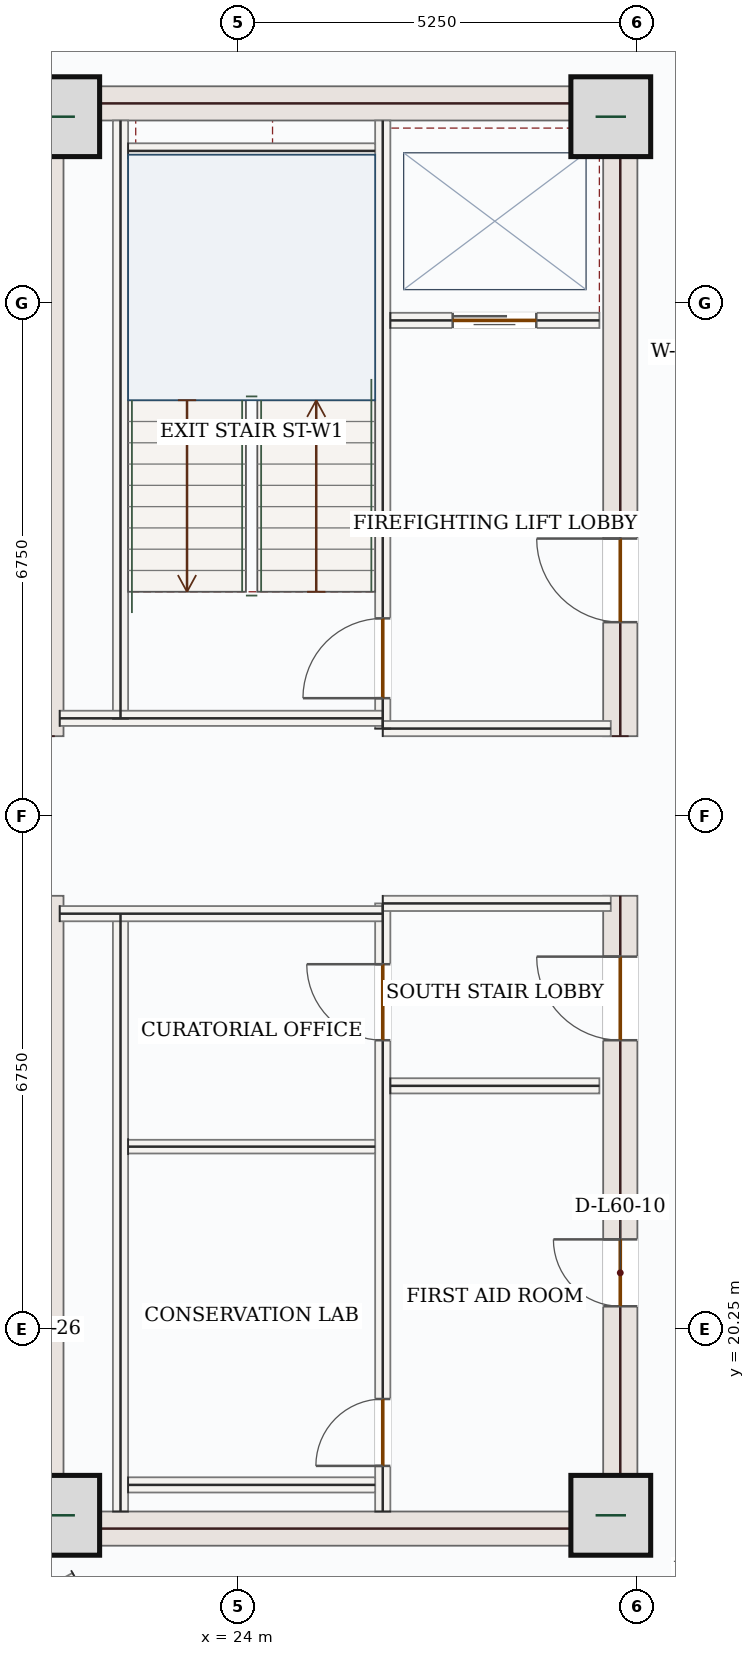
"""IFC4 building model, lengths in metres.
Left out: names, types, materials, properties, quantities, classifications, styles, units other than length and angle.
Written with IfcOpenShell. Run it as: python <this file> out.ifc"""

import sys

from ifc_helpers import new_model, si_unit, direction, frame, frame_2d, origin, origin_2d, place, context, subcontext, project, spatial, rectangle, extrude, source, transform, mapped, element, fill, save


model = new_model("IFC4")
c1 = context("Model", 3, precision=1e-05, world=origin(), true_north=direction((0.0, 1.0)))
c2 = subcontext(c1, "Body", "Model", "MODEL_VIEW")
j1 = project(units=[si_unit("LENGTHUNIT", "METRE"), si_unit("PLANEANGLEUNIT", "RADIAN")], contexts=[c1])
p1 = place(None, origin())
s1 = spatial("IfcSite", under=j1, at=p1, CompositionType="ELEMENT")
p2 = place(p1, origin())
s2 = spatial("IfcBuilding", under=s1, at=p2, CompositionType="ELEMENT")
p3 = place(p2, frame((0.0, 0.0, 254.1)))
s3 = spatial("IfcBuildingStorey", under=s2, at=p3, CompositionType="ELEMENT", Elevation=254.1)
m1 = source(origin(), c2, "Body", "SweptSolid", [
    extrude(rectangle(XDim=8.55, YDim=0.45, at=frame_2d((4.275, 0.0))), origin(), (0.0, 0.0, 1.0), 3.5),
])
for number, where, z_axis, x_axis in (
    (1, (21.475, 17.4, 0.0), (0.0, 0.0, 1.0), (0.0, 1.0, 0.0)),
    (2, (21.475, 28.05, 0.0), (0.0, 0.0, 1.0), (0.0, 1.0, 0.0)),
):
    element("IfcWall", number, at=place(p3, frame(where, z_axis=z_axis, x_axis=x_axis)), inside=s3, PredefinedType="SHEAR", context=c2, shape_type="MappedRepresentation", body=[
        mapped(m1, transform((0.0, 0.0, 0.0), x_axis=(1.0, 0.0, 0.0), y_axis=(0.0, 1.0, 0.0), z_axis=(0.0, 0.0, 1.0), scale=1.0)),
    ])
p4 = place(p3, frame((29.025, 17.4, 0.0), z_axis=(0.0, 0.0, 1.0), x_axis=(0.0, 1.0, 0.0)))
e3 = element("IfcWall", 3, at=p4, inside=s3, PredefinedType="SHEAR", context=c2, shape_type="SweptSolid", body=[
    extrude(rectangle(XDim=8.55, YDim=0.45, at=frame_2d((4.275, 0.0))), origin(), (0.0, 0.0, 1.0), 3.5),
])
p5 = place(p4, frame((6.65, 0.0, 0.0)))
e4 = element("IfcOpeningElement", 4, at=p5, cuts=e3, PredefinedType="OPENING", context=c2, shape_type="SweptSolid", body=[
    extrude(rectangle(XDim=1.1, YDim=2.2, at=frame_2d((0.55, 1.1))), frame((0.0, 0.235, 0.0), z_axis=(0.0, -1.0, 0.0), x_axis=(1.0, 0.0, 0.0)), (0.0, 0.0, 1.0), 0.47),
])
p6 = place(p4, frame((3.15, 0.0, 0.0)))
e5 = element("IfcOpeningElement", 5, at=p6, cuts=e3, PredefinedType="OPENING", context=c2, shape_type="SweptSolid", body=[
    extrude(rectangle(XDim=0.88, YDim=2.1, at=frame_2d((0.44, 1.05))), frame((0.0, 0.235, 0.0), z_axis=(0.0, -1.0, 0.0), x_axis=(1.0, 0.0, 0.0)), (0.0, 0.0, 1.0), 0.47),
])
p7 = place(p3, frame((29.025, 28.05, 0.0), z_axis=(0.0, 0.0, 1.0), x_axis=(0.0, 1.0, 0.0)))
e6 = element("IfcWall", 6, at=p7, inside=s3, PredefinedType="SHEAR", context=c2, shape_type="SweptSolid", body=[
    extrude(rectangle(XDim=8.55, YDim=0.45, at=frame_2d((4.275, 0.0))), origin(), (0.0, 0.0, 1.0), 3.5),
])
p8 = place(p7, frame((1.5, 0.0, 0.0)))
e7 = element("IfcOpeningElement", 7, at=p8, cuts=e6, PredefinedType="OPENING", context=c2, shape_type="SweptSolid", body=[
    extrude(rectangle(XDim=1.1, YDim=2.2, at=frame_2d((0.55, 1.1))), frame((0.0, 0.235, 0.0), z_axis=(0.0, -1.0, 0.0), x_axis=(1.0, 0.0, 0.0)), (0.0, 0.0, 1.0), 0.47),
])
m2 = source(origin(), c2, "Body", "SweptSolid", [
    extrude(rectangle(XDim=7.1, YDim=0.45, at=frame_2d((3.55, 0.0))), origin(), (0.0, 0.0, 1.0), 3.5),
])
for number, where, z_axis, x_axis in (
    (8, (21.7, 17.625, 0.0), (0.0, 0.0, 1.0), (1.0, 0.0, 0.0)),
    (9, (21.7, 36.375, 0.0), (0.0, 0.0, 1.0), (1.0, 0.0, 0.0)),
):
    element("IfcWall", number, at=place(p3, frame(where, z_axis=z_axis, x_axis=x_axis)), inside=s3, PredefinedType="SHEAR", context=c2, shape_type="MappedRepresentation", body=[
        mapped(m2, transform((0.0, 0.0, 0.0), x_axis=(1.0, 0.0, 0.0), y_axis=(0.0, 1.0, 0.0), z_axis=(0.0, 0.0, 1.0), scale=1.0)),
    ])
m3 = source(origin(), c2, "Body", "SweptSolid", [
    extrude(rectangle(XDim=1.05, YDim=1.05, at=origin_2d()), origin(), (0.0, 0.0, 1.0), 3.75),
])
for number, where, z_axis, x_axis in (
    (10, (21.65, 17.8, 0.0), (0.0, 0.0, 1.0), (1.0, 0.0, 0.0)),
    (11, (28.9, 17.8, 0.0), (0.0, 0.0, 1.0), (1.0, 0.0, 0.0)),
    (12, (21.65, 36.2, 0.0), (0.0, 0.0, 1.0), (1.0, 0.0, 0.0)),
    (13, (28.9, 36.2, 0.0), (0.0, 0.0, 1.0), (1.0, 0.0, 0.0)),
):
    element("IfcColumn", number, at=place(p3, frame(where, z_axis=z_axis, x_axis=x_axis)), inside=s3, PredefinedType="COLUMN", context=c2, shape_type="MappedRepresentation", body=[
        mapped(m3, transform((0.0, 0.0, 0.0), x_axis=(1.0, 0.0, 0.0), y_axis=(0.0, 1.0, 0.0), z_axis=(0.0, 0.0, 1.0), scale=1.0)),
    ])
m4 = source(origin(), c2, "Body", "SweptSolid", [
    extrude(rectangle(XDim=4.394, YDim=0.28, at=frame_2d((2.197, 0.0))), origin(), (0.0, 0.0, 1.0), 3.5),
])
p9 = place(p3, frame((18.94, 35.542, 0.0), z_axis=(0.0, 0.0, 1.0), x_axis=(0.707106781187, 0.707106781187, 0.0)))
e14 = element("IfcWall", 14, at=p9, inside=s3, PredefinedType="SOLIDWALL", context=c2, shape_type="MappedRepresentation", body=[
    mapped(m4, transform((0.0, 0.0, 0.0), x_axis=(1.0, 0.0, 0.0), y_axis=(0.0, 1.0, 0.0), z_axis=(0.0, 0.0, 1.0), scale=1.0)),
])
m5 = source(origin(), c2, "Body", "SweptSolid", [
    extrude(rectangle(XDim=7.87, YDim=0.2, at=frame_2d((3.935, 0.0))), origin(), (0.0, 0.0, 1.0), 3.5),
])
for number, where, z_axis, x_axis in (
    (15, (22.45, 17.85, 0.0), (0.0, 0.0, 1.0), (0.0, 1.0, 0.0)),
    (16, (22.45, 28.28, 0.0), (0.0, 0.0, 1.0), (0.0, 1.0, 0.0)),
):
    element("IfcWall", number, at=place(p3, frame(where, z_axis=z_axis, x_axis=x_axis)), inside=s3, PredefinedType="SOLIDWALL", context=c2, shape_type="MappedRepresentation", body=[
        mapped(m5, transform((0.0, 0.0, 0.0), x_axis=(1.0, 0.0, 0.0), y_axis=(0.0, 1.0, 0.0), z_axis=(0.0, 0.0, 1.0), scale=1.0)),
    ])
p10 = place(p3, frame((25.9, 17.85, 0.0), z_axis=(0.0, 0.0, 1.0), x_axis=(0.0, 1.0, 0.0)))
e17 = element("IfcWall", 17, at=p10, inside=s3, PredefinedType="SOLIDWALL", context=c2, shape_type="SweptSolid", body=[
    extrude(rectangle(XDim=8.0, YDim=0.2, at=frame_2d((4.0, 0.0))), origin(), (0.0, 0.0, 1.0), 3.5),
])
p11 = place(p10, frame((6.2, 0.0, 0.0)))
e18 = element("IfcOpeningElement", 18, at=p11, cuts=e17, PredefinedType="OPENING", context=c2, shape_type="SweptSolid", body=[
    extrude(rectangle(XDim=1.0, YDim=2.15, at=frame_2d((0.5, 1.075))), frame((0.0, 0.11, 0.0), z_axis=(0.0, -1.0, 0.0), x_axis=(1.0, 0.0, 0.0)), (0.0, 0.0, 1.0), 0.22),
])
p12 = place(p10, frame((0.6, 0.0, 0.0)))
e19 = element("IfcOpeningElement", 19, at=p12, cuts=e17, PredefinedType="OPENING", context=c2, shape_type="SweptSolid", body=[
    extrude(rectangle(XDim=0.88, YDim=2.1, at=frame_2d((0.44, 1.05))), frame((0.0, 0.11, 0.0), z_axis=(0.0, -1.0, 0.0), x_axis=(1.0, 0.0, 0.0)), (0.0, 0.0, 1.0), 0.22),
])
p13 = place(p3, frame((25.9, 28.15, 0.0), z_axis=(0.0, 0.0, 1.0), x_axis=(0.0, 1.0, 0.0)))
e20 = element("IfcWall", 20, at=p13, inside=s3, PredefinedType="SOLIDWALL", context=c2, shape_type="SweptSolid", body=[
    extrude(rectangle(XDim=8.0, YDim=0.2, at=frame_2d((4.0, 0.0))), origin(), (0.0, 0.0, 1.0), 3.5),
])
p14 = place(p13, frame((0.4, 0.0, 0.0)))
e21 = element("IfcOpeningElement", 21, at=p14, cuts=e20, PredefinedType="OPENING", context=c2, shape_type="SweptSolid", body=[
    extrude(rectangle(XDim=1.05, YDim=2.15, at=frame_2d((0.525, 1.075))), frame((0.0, 0.11, 0.0), z_axis=(0.0, -1.0, 0.0), x_axis=(1.0, 0.0, 0.0)), (0.0, 0.0, 1.0), 0.22),
])
m6 = source(origin(), c2, "Body", "SweptSolid", [
    extrude(rectangle(XDim=4.25, YDim=0.2, at=frame_2d((2.125, 0.0))), origin(), (0.0, 0.0, 1.0), 3.5),
])
p15 = place(p3, frame((21.65, 25.715, 0.0), z_axis=(0.0, 0.0, 1.0), x_axis=(1.0, 0.0, 0.0)))
e22 = element("IfcWall", 22, at=p15, inside=s3, PredefinedType="SOLIDWALL", context=c2, shape_type="MappedRepresentation", body=[
    mapped(m6, transform((0.0, 0.0, 0.0), x_axis=(1.0, 0.0, 0.0), y_axis=(0.0, 1.0, 0.0), z_axis=(0.0, 0.0, 1.0), scale=1.0)),
])
m7 = source(origin(), c2, "Body", "SweptSolid", [
    extrude(rectangle(XDim=3.0, YDim=0.2, at=frame_2d((1.5, 0.0))), origin(), (0.0, 0.0, 1.0), 3.5),
])
p16 = place(p3, frame((25.9, 25.85, 0.0), z_axis=(0.0, 0.0, 1.0), x_axis=(1.0, 0.0, 0.0)))
e23 = element("IfcWall", 23, at=p16, inside=s3, PredefinedType="SOLIDWALL", context=c2, shape_type="MappedRepresentation", body=[
    mapped(m7, transform((0.0, 0.0, 0.0), x_axis=(1.0, 0.0, 0.0), y_axis=(0.0, 1.0, 0.0), z_axis=(0.0, 0.0, 1.0), scale=1.0)),
])
p17 = place(p3, frame((21.65, 28.285, 0.0), z_axis=(0.0, 0.0, 1.0), x_axis=(1.0, 0.0, 0.0)))
e24 = element("IfcWall", 24, at=p17, inside=s3, PredefinedType="SOLIDWALL", context=c2, shape_type="MappedRepresentation", body=[
    mapped(m6, transform((0.0, 0.0, 0.0), x_axis=(1.0, 0.0, 0.0), y_axis=(0.0, 1.0, 0.0), z_axis=(0.0, 0.0, 1.0), scale=1.0)),
])
p18 = place(p3, frame((25.9, 28.15, 0.0), z_axis=(0.0, 0.0, 1.0), x_axis=(1.0, 0.0, 0.0)))
e25 = element("IfcWall", 25, at=p18, inside=s3, PredefinedType="SOLIDWALL", context=c2, shape_type="MappedRepresentation", body=[
    mapped(m7, transform((0.0, 0.0, 0.0), x_axis=(1.0, 0.0, 0.0), y_axis=(0.0, 1.0, 0.0), z_axis=(0.0, 0.0, 1.0), scale=1.0)),
])
m8 = source(origin(), c2, "Body", "SweptSolid", [
    extrude(rectangle(XDim=3.25, YDim=0.2, at=frame_2d((1.625, 0.0))), origin(), (0.0, 0.0, 1.0), 3.5),
])
for number, where, z_axis, x_axis in (
    (26, (22.55, 35.75, 0.0), (0.0, 0.0, 1.0), (1.0, 0.0, 0.0)),
    (27, (22.55, 18.2, 0.0), (0.0, 0.0, 1.0), (1.0, 0.0, 0.0)),
):
    element("IfcWall", number, at=place(p3, frame(where, z_axis=z_axis, x_axis=x_axis)), inside=s3, PredefinedType="SOLIDWALL", context=c2, shape_type="MappedRepresentation", body=[
        mapped(m8, transform((0.0, 0.0, 0.0), x_axis=(1.0, 0.0, 0.0), y_axis=(0.0, 1.0, 0.0), z_axis=(0.0, 0.0, 1.0), scale=1.0)),
    ])
m9 = source(origin(), c2, "Body", "SweptSolid", [
    extrude(rectangle(XDim=3.25, YDim=0.18, at=frame_2d((1.625, 0.0))), origin(), (0.0, 0.0, 1.0), 3.5),
])
p19 = place(p3, frame((22.55, 22.65, 0.0), z_axis=(0.0, 0.0, 1.0), x_axis=(1.0, 0.0, 0.0)))
e28 = element("IfcWall", 28, at=p19, inside=s3, PredefinedType="PARTITIONING", context=c2, shape_type="MappedRepresentation", body=[
    mapped(m9, transform((0.0, 0.0, 0.0), x_axis=(1.0, 0.0, 0.0), y_axis=(0.0, 1.0, 0.0), z_axis=(0.0, 0.0, 1.0), scale=1.0)),
])
p20 = place(p3, frame((26.0, 33.52, 0.0), z_axis=(0.0, 0.0, 1.0), x_axis=(1.0, 0.0, 0.0)))
e29 = element("IfcWall", 29, at=p20, inside=s3, PredefinedType="SOLIDWALL", context=c2, shape_type="SweptSolid", body=[
    extrude(rectangle(XDim=2.75, YDim=0.2, at=frame_2d((1.375, 0.0))), origin(), (0.0, 0.0, 1.0), 3.5),
])
p21 = place(p20, frame((0.82, 0.0, 0.0)))
e30 = element("IfcOpeningElement", 30, at=p21, cuts=e29, PredefinedType="OPENING", context=c2, shape_type="SweptSolid", body=[
    extrude(rectangle(XDim=1.1, YDim=2.15, at=frame_2d((0.55, 1.075))), frame((0.0, 0.11, 0.0), z_axis=(0.0, -1.0, 0.0), x_axis=(1.0, 0.0, 0.0)), (0.0, 0.0, 1.0), 0.22),
])
m10 = source(origin(), c2, "Body", "SweptSolid", [
    extrude(rectangle(XDim=2.75, YDim=0.2, at=frame_2d((1.375, 0.0))), origin(), (0.0, 0.0, 1.0), 3.5),
])
p22 = place(p3, frame((26.0, 23.45, 0.0), z_axis=(0.0, 0.0, 1.0), x_axis=(1.0, 0.0, 0.0)))
e31 = element("IfcWall", 31, at=p22, inside=s3, PredefinedType="SOLIDWALL", context=c2, shape_type="MappedRepresentation", body=[
    mapped(m10, transform((0.0, 0.0, 0.0), x_axis=(1.0, 0.0, 0.0), y_axis=(0.0, 1.0, 0.0), z_axis=(0.0, 0.0, 1.0), scale=1.0)),
])
m11 = source(origin(), c2, "Body", "SweptSolid", [
    extrude(rectangle(XDim=4.695, YDim=0.14, at=frame_2d((2.348, 0.0))), origin(), (0.0, 0.0, 1.0), 3.5),
])
p23 = place(p3, frame((21.852, 16.98, 0.0), z_axis=(0.0, 0.0, 1.0), x_axis=(-0.877559526902, -0.479467701461, 0.0)))
e32 = element("IfcWall", 32, at=p23, inside=s3, PredefinedType="PARTITIONING", context=c2, shape_type="MappedRepresentation", body=[
    mapped(m11, transform((0.0, 0.0, 0.0), x_axis=(1.0, 0.0, 0.0), y_axis=(0.0, 1.0, 0.0), z_axis=(0.0, 0.0, 1.0), scale=1.0)),
])
m12 = source(origin(), c2, "Body", "SweptSolid", [
    extrude(rectangle(XDim=1.05, YDim=2.15, at=frame_2d((0.525, 1.075))), frame((0.0, 0.025, 0.0), z_axis=(0.0, -1.0, 0.0), x_axis=(1.0, 0.0, 0.0)), (0.0, 0.0, 1.0), 0.05),
])
p24 = place(p14, origin())
e33 = element("IfcDoor", 33, at=p24, inside=s3, OperationType="SINGLE_SWING_LEFT", PredefinedType="DOOR", context=c2, shape_type="MappedRepresentation", body=[
    mapped(m12, transform((0.0, 0.0, 0.0), x_axis=(1.0, 0.0, 0.0), y_axis=(0.0, 1.0, 0.0), z_axis=(0.0, 0.0, 1.0), scale=1.0)),
])
fill(e21, e33)
m13 = source(origin(), c2, "Body", "SweptSolid", [
    extrude(rectangle(XDim=1.0, YDim=2.15, at=frame_2d((0.5, 1.075))), frame((0.0, 0.025, 0.0), z_axis=(0.0, -1.0, 0.0), x_axis=(1.0, 0.0, 0.0)), (0.0, 0.0, 1.0), 0.05),
])
p25 = place(p11, origin())
e34 = element("IfcDoor", 34, at=p25, inside=s3, OperationType="SINGLE_SWING_RIGHT", PredefinedType="DOOR", context=c2, shape_type="MappedRepresentation", body=[
    mapped(m13, transform((0.0, 0.0, 0.0), x_axis=(1.0, 0.0, 0.0), y_axis=(0.0, 1.0, 0.0), z_axis=(0.0, 0.0, 1.0), scale=1.0)),
])
fill(e18, e34)
m14 = source(origin(), c2, "Body", "SweptSolid", [
    extrude(rectangle(XDim=0.88, YDim=2.1, at=frame_2d((0.44, 1.05))), frame((0.0, 0.025, 0.0), z_axis=(0.0, -1.0, 0.0), x_axis=(1.0, 0.0, 0.0)), (0.0, 0.0, 1.0), 0.05),
])
p26 = place(p12, origin())
e35 = element("IfcDoor", 35, at=p26, inside=s3, OperationType="SINGLE_SWING_LEFT", PredefinedType="DOOR", context=c2, shape_type="MappedRepresentation", body=[
    mapped(m14, transform((0.0, 0.0, 0.0), x_axis=(1.0, 0.0, 0.0), y_axis=(0.0, 1.0, 0.0), z_axis=(0.0, 0.0, 1.0), scale=1.0)),
])
fill(e19, e35)
m15 = source(origin(), c2, "Body", "SweptSolid", [
    extrude(rectangle(XDim=1.1, YDim=2.15, at=frame_2d((0.55, 1.075))), frame((0.0, 0.025, 0.0), z_axis=(0.0, -1.0, 0.0), x_axis=(1.0, 0.0, 0.0)), (0.0, 0.0, 1.0), 0.05),
])
p27 = place(p21, origin())
e36 = element("IfcDoor", 36, at=p27, inside=s3, OperationType="DOUBLE_DOOR_SLIDING", PredefinedType="DOOR", context=c2, shape_type="MappedRepresentation", body=[
    mapped(m15, transform((0.0, 0.0, 0.0), x_axis=(1.0, 0.0, 0.0), y_axis=(0.0, 1.0, 0.0), z_axis=(0.0, 0.0, 1.0), scale=1.0)),
])
fill(e30, e36)
m16 = source(origin(), c2, "Body", "SweptSolid", [
    extrude(rectangle(XDim=1.1, YDim=2.2, at=frame_2d((0.55, 1.1))), frame((0.0, 0.025, 0.0), z_axis=(0.0, -1.0, 0.0), x_axis=(1.0, 0.0, 0.0)), (0.0, 0.0, 1.0), 0.05),
])
p28 = place(p8, origin())
e37 = element("IfcDoor", 37, at=p28, inside=s3, OperationType="SINGLE_SWING_RIGHT", PredefinedType="DOOR", context=c2, shape_type="MappedRepresentation", body=[
    mapped(m16, transform((0.0, 0.0, 0.0), x_axis=(1.0, 0.0, 0.0), y_axis=(0.0, 1.0, 0.0), z_axis=(0.0, 0.0, 1.0), scale=1.0)),
])
fill(e7, e37)
p29 = place(p5, origin())
e38 = element("IfcDoor", 38, at=p29, inside=s3, OperationType="SINGLE_SWING_RIGHT", PredefinedType="DOOR", context=c2, shape_type="MappedRepresentation", body=[
    mapped(m16, transform((0.0, 0.0, 0.0), x_axis=(1.0, 0.0, 0.0), y_axis=(0.0, 1.0, 0.0), z_axis=(0.0, 0.0, 1.0), scale=1.0)),
])
fill(e4, e38)
p30 = place(p6, origin())
e39 = element("IfcDoor", 39, at=p30, inside=s3, OperationType="SINGLE_SWING_RIGHT", PredefinedType="DOOR", context=c2, shape_type="MappedRepresentation", body=[
    mapped(m14, transform((0.0, 0.0, 0.0), x_axis=(1.0, 0.0, 0.0), y_axis=(0.0, 1.0, 0.0), z_axis=(0.0, 0.0, 1.0), scale=1.0)),
])
fill(e5, e39)
save(model, sys.argv[1])
